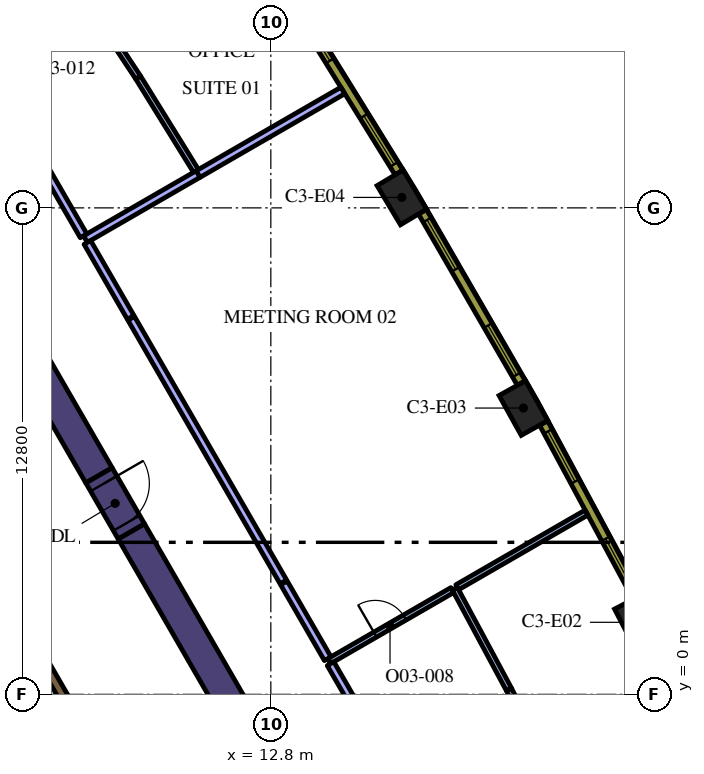
"""IFC4 building model, lengths in metres.
Left out: names, types, materials, properties, quantities, classifications, styles, units other than length and angle.
Written with IfcOpenShell. Run it as: python <this file> out.ifc"""

import sys

from ifc_helpers import new_model, si_unit, direction, frame, frame_2d, origin, origin_2d, place, context, subcontext, project, spatial, rectangle, extrude, element, fill, save


model = new_model("IFC4")
c1 = context("Model", 3, precision=1e-05, world=origin(), true_north=direction((0.0, 1.0)))
c2 = subcontext(c1, "Body", "Model", "MODEL_VIEW")
j1 = project(units=[si_unit("LENGTHUNIT", "METRE"), si_unit("PLANEANGLEUNIT", "RADIAN")], contexts=[c1])
p1 = place(None, origin())
s1 = spatial("IfcSite", under=j1, at=p1, CompositionType="ELEMENT")
p2 = place(p1, origin())
s2 = spatial("IfcBuilding", under=s1, at=p2, CompositionType="ELEMENT")
p3 = place(p2, frame((0.0, 0.0, 166.8)))
s3 = spatial("IfcBuildingStorey", under=s2, at=p3, CompositionType="ELEMENT", Elevation=166.8)
for number, where, z_axis, x_axis in (
    (1, (22.476, 1.896, 0.0), (0.0, 0.0, 1.0), (-0.46, 0.888, 0.0)),
    (2, (19.447, 7.533, 0.0), (0.0, 0.0, 1.0), (-0.487, 0.874, 0.0)),
    (3, (16.247, 13.075, 0.0), (0.0, 0.0, 1.0), (-0.513, 0.858, 0.0)),
):
    element("IfcColumn", number, at=place(p3, frame(where, z_axis=z_axis, x_axis=x_axis)), inside=s3, PredefinedType="COLUMN", context=c2, shape_type="SweptSolid", body=[
        extrude(rectangle(XDim=1.2, YDim=0.8, at=origin_2d()), origin(), (0.0, 0.0, 1.0), 4.2),
    ])
p4 = place(p3, frame((9.129, 4.289, 0.0), z_axis=(0.0, 0.0, 1.0), x_axis=(0.499995742806, -0.866027861663, 0.0)))
e4 = element("IfcWall", 4, at=p4, inside=s3, PredefinedType="SOLIDWALL", context=c2, shape_type="SweptSolid", body=[
    extrude(rectangle(XDim=12.527, YDim=0.8, at=frame_2d((6.264, 0.0))), origin(), (0.0, 0.0, 1.0), 4.2),
])
p5 = place(p3, frame((8.279, 5.761, 0.0), z_axis=(0.0, 0.0, 1.0), x_axis=(-0.500010359015, 0.866019422922, 0.0)))
e5 = element("IfcWall", 5, at=p5, inside=s3, PredefinedType="SOLIDWALL", context=c2, shape_type="SweptSolid", body=[
    extrude(rectangle(XDim=12.528, YDim=0.8, at=frame_2d((6.264, 0.0))), origin(), (0.0, 0.0, 1.0), 4.2),
])
p6 = place(p3, frame((8.565, -2.185, 0.0), z_axis=(0.0, 0.0, 1.0), x_axis=(-0.499997954832, 0.866026584559, 0.0)))
e6 = element("IfcWall", 6, at=p6, inside=s3, PredefinedType="SOLIDWALL", context=c2, shape_type="SweptSolid", body=[
    extrude(rectangle(XDim=12.35, YDim=0.25, at=frame_2d((6.175, 0.0))), origin(), (0.0, 0.0, 1.0), 4.2),
])
p7 = place(p6, frame((0.585, 0.0, 0.0)))
e7 = element("IfcOpeningElement", 7, at=p7, cuts=e6, PredefinedType="OPENING", context=c2, shape_type="SweptSolid", body=[
    extrude(rectangle(XDim=1.1, YDim=2.1, at=frame_2d((0.55, 1.05))), frame((0.0, 0.135, 0.0), z_axis=(0.0, -1.0, 0.0), x_axis=(1.0, 0.0, 0.0)), (0.0, 0.0, 1.0), 0.27),
])
p8 = place(p3, frame((8.279, 5.761, 0.0), z_axis=(0.0, 0.0, 1.0), x_axis=(0.500062241894, -0.865989465428, 0.0)))
e8 = element("IfcWall", 8, at=p8, inside=s3, PredefinedType="SOLIDWALL", context=c2, shape_type="SweptSolid", body=[
    extrude(rectangle(XDim=1.7, YDim=0.8, at=frame_2d((0.85, 0.0))), origin(), (0.0, 0.0, 1.0), 4.2),
])
p9 = place(p8, frame((0.25, 0.0, 0.0)))
e9 = element("IfcOpeningElement", 9, at=p9, cuts=e8, PredefinedType="OPENING", context=c2, shape_type="SweptSolid", body=[
    extrude(rectangle(XDim=1.2, YDim=2.1, at=frame_2d((0.6, 1.05))), frame((0.0, 0.41, 0.0), z_axis=(0.0, -1.0, 0.0), x_axis=(1.0, 0.0, 0.0)), (0.0, 0.0, 1.0), 0.82),
])
p10 = place(p3, frame((19.066, 0.129, 0.0), z_axis=(0.0, 0.0, 1.0), x_axis=(0.446215695511, -0.894925445543, 0.0)))
e10 = element("IfcWall", 10, at=p10, inside=s3, PredefinedType="PARTITIONING", context=c2, shape_type="SweptSolid", body=[
    extrude(rectangle(XDim=3.328, YDim=0.15, at=frame_2d((1.664, 0.0))), origin(), (0.0, 0.0, 1.0), 3.15),
])
p11 = place(p10, frame((1.228, 0.0, 0.0)))
e11 = element("IfcOpeningElement", 11, at=p11, cuts=e10, PredefinedType="OPENING", context=c2, shape_type="SweptSolid", body=[
    extrude(rectangle(XDim=0.9, YDim=2.1, at=frame_2d((0.45, 1.05))), frame((0.0, 0.085, 0.0), z_axis=(0.0, -1.0, 0.0), x_axis=(1.0, 0.0, 0.0)), (0.0, 0.0, 1.0), 0.17),
])
p12 = place(p3, frame((19.066, 0.129, 0.0), z_axis=(0.0, 0.0, 1.0), x_axis=(-0.473359743891, 0.88086920304, 0.0)))
e12 = element("IfcWall", 12, at=p12, inside=s3, PredefinedType="PARTITIONING", context=c2, shape_type="SweptSolid", body=[
    extrude(rectangle(XDim=3.01, YDim=0.15, at=frame_2d((1.505, 0.0))), origin(), (0.0, 0.0, 1.0), 3.15),
])
p13 = place(p3, frame((17.706, 2.819, 0.0), z_axis=(0.0, 0.0, 1.0), x_axis=(0.866023031919, 0.500004108169, 0.0)))
e13 = element("IfcWall", 13, at=p13, inside=s3, PredefinedType="PARTITIONING", context=c2, shape_type="SweptSolid", body=[
    extrude(rectangle(XDim=3.927, YDim=0.15, at=frame_2d((1.963, 0.0))), origin(), (0.0, 0.0, 1.0), 3.15),
])
p14 = place(p3, frame((14.334, 0.872, 0.0), z_axis=(0.0, 0.0, 1.0), x_axis=(0.866027010039, 0.499997217876, 0.0)))
e14 = element("IfcWall", 14, at=p14, inside=s3, PredefinedType="PARTITIONING", context=c2, shape_type="SweptSolid", body=[
    extrude(rectangle(XDim=3.743, YDim=0.15, at=frame_2d((1.872, 0.0))), origin(), (0.0, 0.0, 1.0), 3.15),
])
p15 = place(p14, frame((1.4, 0.0, 0.0)))
e15 = element("IfcOpeningElement", 15, at=p15, cuts=e14, PredefinedType="OPENING", context=c2, shape_type="SweptSolid", body=[
    extrude(rectangle(XDim=0.9, YDim=2.1, at=frame_2d((0.45, 1.05))), frame((0.0, 0.085, 0.0), z_axis=(0.0, -1.0, 0.0), x_axis=(1.0, 0.0, 0.0)), (0.0, 0.0, 1.0), 0.17),
])
p16 = place(p3, frame((18.489, -6.324, 0.0), z_axis=(0.0, 0.0, 1.0), x_axis=(-0.500003913404, 0.866023144368, 0.0)))
e16 = element("IfcWall", 16, at=p16, inside=s3, PredefinedType="PARTITIONING", context=c2, shape_type="SweptSolid", body=[
    extrude(rectangle(XDim=8.234, YDim=0.2, at=frame_2d((4.117, 0.0))), origin(), (0.0, 0.0, 1.0), 3.15),
])
p17 = place(p3, frame((10.879, 13.685, 0.0), z_axis=(0.0, 0.0, 1.0), x_axis=(0.866035177799, 0.499983070528, 0.0)))
e17 = element("IfcWall", 17, at=p17, inside=s3, PredefinedType="PARTITIONING", context=c2, shape_type="SweptSolid", body=[
    extrude(rectangle(XDim=4.406, YDim=0.2, at=frame_2d((2.203, 0.0))), origin(), (0.0, 0.0, 1.0), 3.15),
])
p18 = place(p3, frame((7.922, 11.978, 0.0), z_axis=(0.0, 0.0, 1.0), x_axis=(0.866008564848, 0.50002916476, 0.0)))
e18 = element("IfcWall", 18, at=p18, inside=s3, PredefinedType="PARTITIONING", context=c2, shape_type="SweptSolid", body=[
    extrude(rectangle(XDim=3.422, YDim=0.2, at=frame_2d((1.711, 0.0))), origin(), (0.0, 0.0, 1.0), 3.15),
])
p19 = place(p3, frame((13.13, 2.958, 0.0), z_axis=(0.0, 0.0, 1.0), x_axis=(-0.499995158272, 0.866028199139, 0.0)))
e19 = element("IfcWall", 19, at=p19, inside=s3, PredefinedType="PARTITIONING", context=c2, shape_type="SweptSolid", body=[
    extrude(rectangle(XDim=8.008, YDim=0.2, at=frame_2d((4.004, 0.0))), origin(), (0.0, 0.0, 1.0), 3.15),
])
p20 = place(p3, frame((9.111, 9.918, 0.0), z_axis=(0.0, 0.0, 1.0), x_axis=(-0.499954382462, 0.86605173948, 0.0)))
e20 = element("IfcWall", 20, at=p20, inside=s3, PredefinedType="PARTITIONING", context=c2, shape_type="SweptSolid", body=[
    extrude(rectangle(XDim=2.278, YDim=0.2, at=frame_2d((1.139, 0.0))), origin(), (0.0, 0.0, 1.0), 3.15),
])
p21 = place(p3, frame((14.297, 0.937, 0.0), z_axis=(0.0, 0.0, 1.0), x_axis=(-0.499970234539, 0.866042588199, 0.0)))
e21 = element("IfcWall", 21, at=p21, inside=s3, PredefinedType="PARTITIONING", context=c2, shape_type="SweptSolid", body=[
    extrude(rectangle(XDim=2.303, YDim=0.2, at=frame_2d((1.151, 0.0))), origin(), (0.0, 0.0, 1.0), 3.15),
])
p22 = place(p3, frame((10.83, 13.772, 0.0), z_axis=(0.0, 0.0, 1.0), x_axis=(-0.526229630206, 0.850342505284, 0.0)))
e22 = element("IfcWall", 22, at=p22, inside=s3, PredefinedType="PARTITIONING", context=c2, shape_type="SweptSolid", body=[
    extrude(rectangle(XDim=2.892, YDim=0.15, at=frame_2d((1.446, 0.0))), origin(), (0.0, 0.0, 1.0), 3.15),
])
p23 = place(p3, frame((7.461, 19.022, 0.0), z_axis=(0.0, 0.0, 1.0), x_axis=(0.551902709159, -0.833908507945, 0.0)))
e23 = element("IfcWall", 23, at=p23, inside=s3, PredefinedType="PARTITIONING", context=c2, shape_type="SweptSolid", body=[
    extrude(rectangle(XDim=3.347, YDim=0.15, at=frame_2d((1.673, 0.0))), origin(), (0.0, 0.0, 1.0), 3.15),
])
p24 = place(p23, frame((1.247, 0.0, 0.0)))
e24 = element("IfcOpeningElement", 24, at=p24, cuts=e23, PredefinedType="OPENING", context=c2, shape_type="SweptSolid", body=[
    extrude(rectangle(XDim=0.9, YDim=2.1, at=frame_2d((0.45, 1.05))), frame((0.0, 0.085, 0.0), z_axis=(0.0, -1.0, 0.0), x_axis=(1.0, 0.0, 0.0)), (0.0, 0.0, 1.0), 0.17),
])
p25 = place(p3, frame((7.872, 12.064, 0.0), z_axis=(0.0, 0.0, 1.0), x_axis=(-0.499995192696, 0.866028179265, 0.0)))
e25 = element("IfcWall", 25, at=p25, inside=s3, PredefinedType="PARTITIONING", context=c2, shape_type="SweptSolid", body=[
    extrude(rectangle(XDim=8.239, YDim=0.2, at=frame_2d((4.12, 0.0))), origin(), (0.0, 0.0, 1.0), 3.15),
])
p26 = place(p25, frame((3.6, 0.0, 0.0)))
e26 = element("IfcOpeningElement", 26, at=p26, cuts=e25, PredefinedType="OPENING", context=c2, shape_type="SweptSolid", body=[
    extrude(rectangle(XDim=1.0, YDim=2.1, at=frame_2d((0.5, 1.05))), frame((0.0, 0.11, 0.0), z_axis=(0.0, -1.0, 0.0), x_axis=(1.0, 0.0, 0.0)), (0.0, 0.0, 1.0), 0.22),
])
p27 = place(p3, frame((22.44, 2.555, 0.0), z_axis=(0.0, 0.0, 1.0), x_axis=(-0.473349833294, 0.880874528704, 0.0)))
e27 = element("IfcWall", 27, at=p27, inside=s3, PredefinedType="SOLIDWALL", context=c2, shape_type="SweptSolid", body=[
    extrude(rectangle(XDim=5.204, YDim=0.24, at=frame_2d((2.602, 0.0))), origin(), (0.0, 0.0, 1.0), 3.95),
])
p28 = place(p27, frame((0.248, 0.0, 0.9)))
e28 = element("IfcOpeningElement", 28, at=p28, cuts=e27, PredefinedType="OPENING", context=c2, shape_type="SweptSolid", body=[
    extrude(rectangle(XDim=1.5, YDim=2.55, at=frame_2d((0.75, 1.275))), frame((0.0, 0.13, 0.0), z_axis=(0.0, -1.0, 0.0), x_axis=(1.0, 0.0, 0.0)), (0.0, 0.0, 1.0), 0.26),
])
p29 = place(p27, frame((3.455, 0.0, 0.9)))
e29 = element("IfcOpeningElement", 29, at=p29, cuts=e27, PredefinedType="OPENING", context=c2, shape_type="SweptSolid", body=[
    extrude(rectangle(XDim=1.5, YDim=2.55, at=frame_2d((0.75, 1.275))), frame((0.0, 0.13, 0.0), z_axis=(0.0, -1.0, 0.0), x_axis=(1.0, 0.0, 0.0)), (0.0, 0.0, 1.0), 0.26),
])
p30 = place(p3, frame((19.391, 8.191, 0.0), z_axis=(0.0, 0.0, 1.0), x_axis=(-0.500009456303, 0.866019944116, 0.0)))
e30 = element("IfcWall", 30, at=p30, inside=s3, PredefinedType="SOLIDWALL", context=c2, shape_type="SweptSolid", body=[
    extrude(rectangle(XDim=5.204, YDim=0.24, at=frame_2d((2.602, 0.0))), origin(), (0.0, 0.0, 1.0), 3.95),
])
p31 = place(p30, frame((0.248, 0.0, 0.9)))
e31 = element("IfcOpeningElement", 31, at=p31, cuts=e30, PredefinedType="OPENING", context=c2, shape_type="SweptSolid", body=[
    extrude(rectangle(XDim=1.5, YDim=2.55, at=frame_2d((0.75, 1.275))), frame((0.0, 0.13, 0.0), z_axis=(0.0, -1.0, 0.0), x_axis=(1.0, 0.0, 0.0)), (0.0, 0.0, 1.0), 0.26),
])
p32 = place(p30, frame((3.455, 0.0, 0.9)))
e32 = element("IfcOpeningElement", 32, at=p32, cuts=e30, PredefinedType="OPENING", context=c2, shape_type="SweptSolid", body=[
    extrude(rectangle(XDim=1.5, YDim=2.55, at=frame_2d((0.75, 1.275))), frame((0.0, 0.13, 0.0), z_axis=(0.0, -1.0, 0.0), x_axis=(1.0, 0.0, 0.0)), (0.0, 0.0, 1.0), 0.26),
])
p33 = place(p3, frame((16.171, 13.731, 0.0), z_axis=(0.0, 0.0, 1.0), x_axis=(-0.526197926587, 0.850362124072, 0.0)))
e33 = element("IfcWall", 33, at=p33, inside=s3, PredefinedType="SOLIDWALL", context=c2, shape_type="SweptSolid", body=[
    extrude(rectangle(XDim=5.203, YDim=0.24, at=frame_2d((2.602, 0.0))), origin(), (0.0, 0.0, 1.0), 3.95),
])
p34 = place(p33, frame((0.248, 0.0, 0.9)))
e34 = element("IfcOpeningElement", 34, at=p34, cuts=e33, PredefinedType="OPENING", context=c2, shape_type="SweptSolid", body=[
    extrude(rectangle(XDim=1.5, YDim=2.55, at=frame_2d((0.75, 1.275))), frame((0.0, 0.13, 0.0), z_axis=(0.0, -1.0, 0.0), x_axis=(1.0, 0.0, 0.0)), (0.0, 0.0, 1.0), 0.26),
])
p35 = place(p33, frame((3.455, 0.0, 0.9)))
e35 = element("IfcOpeningElement", 35, at=p35, cuts=e33, PredefinedType="OPENING", context=c2, shape_type="SweptSolid", body=[
    extrude(rectangle(XDim=1.5, YDim=2.55, at=frame_2d((0.75, 1.275))), frame((0.0, 0.13, 0.0), z_axis=(0.0, -1.0, 0.0), x_axis=(1.0, 0.0, 0.0)), (0.0, 0.0, 1.0), 0.26),
])
p36 = place(p9, origin())
e36 = element("IfcDoor", 36, at=p36, inside=s3, OperationType="SINGLE_SWING_LEFT", PredefinedType="DOOR", context=c2, shape_type="SweptSolid", body=[
    extrude(rectangle(XDim=1.2, YDim=2.1, at=frame_2d((0.6, 1.05))), frame((0.0, 0.025, 0.0), z_axis=(0.0, -1.0, 0.0), x_axis=(1.0, 0.0, 0.0)), (0.0, 0.0, 1.0), 0.05),
])
fill(e9, e36)
p37 = place(p15, origin())
e37 = element("IfcDoor", 37, at=p37, inside=s3, OperationType="SINGLE_SWING_LEFT", PredefinedType="DOOR", context=c2, shape_type="SweptSolid", body=[
    extrude(rectangle(XDim=0.9, YDim=2.1, at=frame_2d((0.45, 1.05))), frame((0.0, 0.025, 0.0), z_axis=(0.0, -1.0, 0.0), x_axis=(1.0, 0.0, 0.0)), (0.0, 0.0, 1.0), 0.05),
])
fill(e15, e37)
p38 = place(p28, origin())
e38 = element("IfcWindow", 38, at=p38, inside=s3, PartitioningType="SINGLE_PANEL", PredefinedType="WINDOW", context=c2, shape_type="SweptSolid", body=[
    extrude(rectangle(XDim=1.5, YDim=2.55, at=frame_2d((0.75, 1.275))), frame((0.0, 0.04, 0.0), z_axis=(0.0, -1.0, 0.0), x_axis=(1.0, 0.0, 0.0)), (0.0, 0.0, 1.0), 0.06),
])
fill(e28, e38)
p39 = place(p29, origin())
e39 = element("IfcWindow", 39, at=p39, inside=s3, PartitioningType="SINGLE_PANEL", PredefinedType="WINDOW", context=c2, shape_type="SweptSolid", body=[
    extrude(rectangle(XDim=1.5, YDim=2.55, at=frame_2d((0.75, 1.275))), frame((0.0, 0.04, 0.0), z_axis=(0.0, -1.0, 0.0), x_axis=(1.0, 0.0, 0.0)), (0.0, 0.0, 1.0), 0.06),
])
fill(e29, e39)
p40 = place(p31, origin())
e40 = element("IfcWindow", 40, at=p40, inside=s3, PartitioningType="SINGLE_PANEL", PredefinedType="WINDOW", context=c2, shape_type="SweptSolid", body=[
    extrude(rectangle(XDim=1.5, YDim=2.55, at=frame_2d((0.75, 1.275))), frame((0.0, 0.04, 0.0), z_axis=(0.0, -1.0, 0.0), x_axis=(1.0, 0.0, 0.0)), (0.0, 0.0, 1.0), 0.06),
])
fill(e31, e40)
p41 = place(p32, origin())
e41 = element("IfcWindow", 41, at=p41, inside=s3, PartitioningType="SINGLE_PANEL", PredefinedType="WINDOW", context=c2, shape_type="SweptSolid", body=[
    extrude(rectangle(XDim=1.5, YDim=2.55, at=frame_2d((0.75, 1.275))), frame((0.0, 0.04, 0.0), z_axis=(0.0, -1.0, 0.0), x_axis=(1.0, 0.0, 0.0)), (0.0, 0.0, 1.0), 0.06),
])
fill(e32, e41)
p42 = place(p34, origin())
e42 = element("IfcWindow", 42, at=p42, inside=s3, PartitioningType="SINGLE_PANEL", PredefinedType="WINDOW", context=c2, shape_type="SweptSolid", body=[
    extrude(rectangle(XDim=1.5, YDim=2.55, at=frame_2d((0.75, 1.275))), frame((0.0, 0.04, 0.0), z_axis=(0.0, -1.0, 0.0), x_axis=(1.0, 0.0, 0.0)), (0.0, 0.0, 1.0), 0.06),
])
fill(e34, e42)
p43 = place(p35, origin())
e43 = element("IfcWindow", 43, at=p43, inside=s3, PartitioningType="SINGLE_PANEL", PredefinedType="WINDOW", context=c2, shape_type="SweptSolid", body=[
    extrude(rectangle(XDim=1.5, YDim=2.55, at=frame_2d((0.75, 1.275))), frame((0.0, 0.04, 0.0), z_axis=(0.0, -1.0, 0.0), x_axis=(1.0, 0.0, 0.0)), (0.0, 0.0, 1.0), 0.06),
])
fill(e35, e43)
save(model, sys.argv[1])
